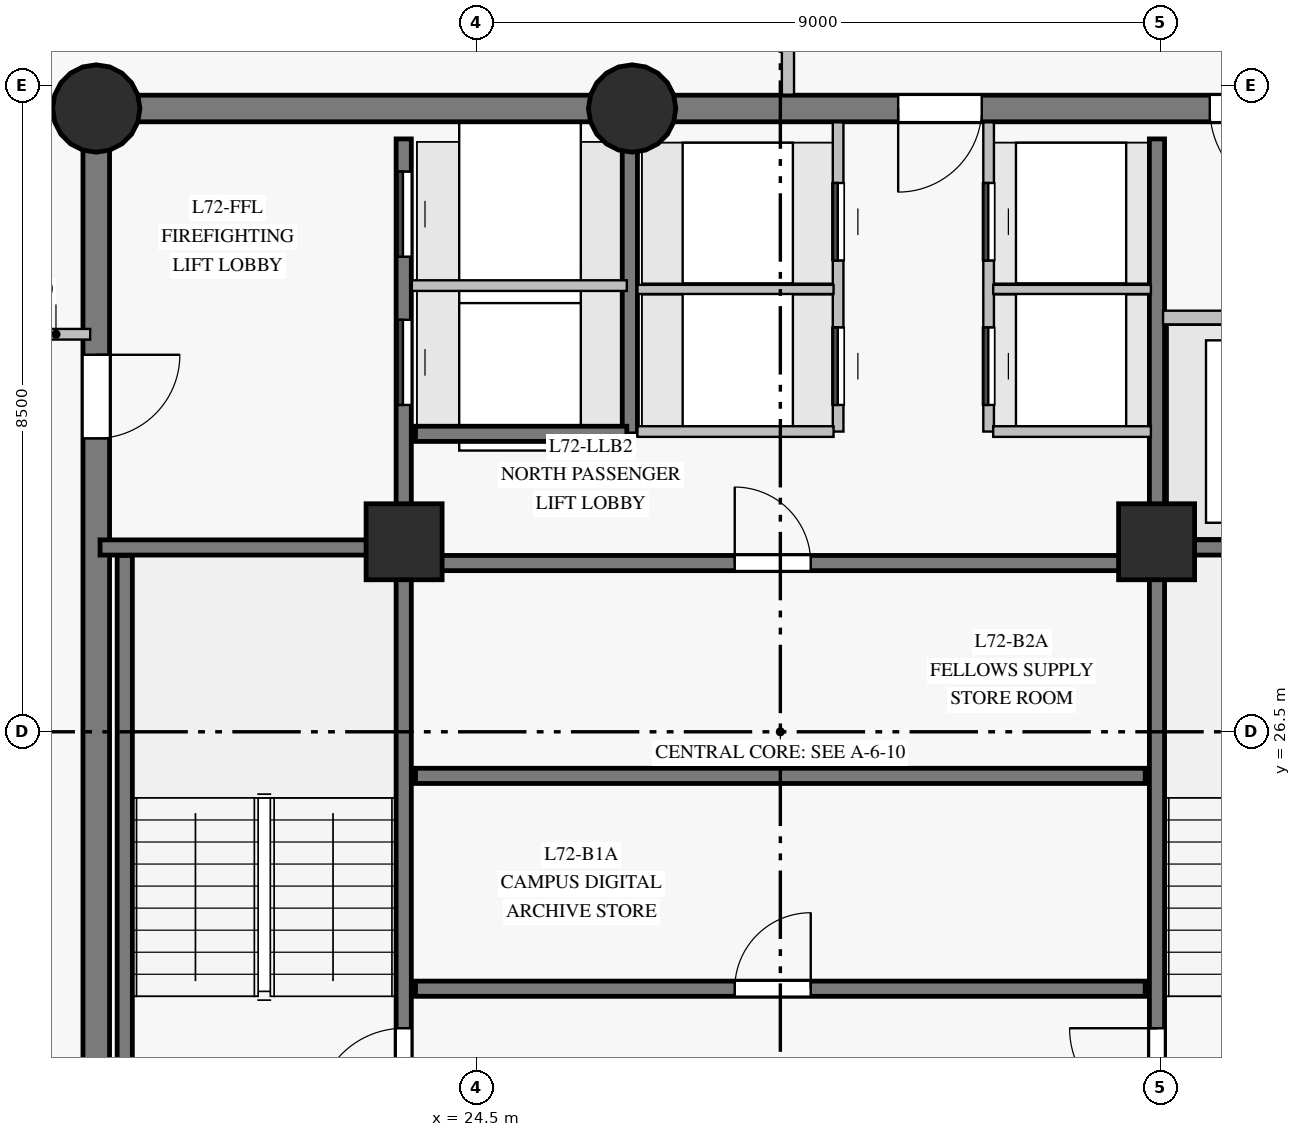
"""IFC4 building model, lengths in metres.
Left out: names, types, materials, properties, quantities, classifications, styles, units other than length and angle.
Written with IfcOpenShell. Run it as: python <this file> out.ifc"""

import sys

from ifc_helpers import new_model, si_unit, direction, frame, frame_2d, origin, origin_with_axes, origin_2d, place, context, subcontext, project, spatial, rectangle, circle, extrude, source, transform, mapped, element, fill, save


model = new_model("IFC4")
c1 = context("Model", 3, precision=1e-05, world=origin(), true_north=direction((0.0, 1.0)))
c2 = subcontext(c1, "Body", "Model", "MODEL_VIEW")
j1 = project(units=[si_unit("LENGTHUNIT", "METRE"), si_unit("PLANEANGLEUNIT", "RADIAN")], contexts=[c1])
p1 = place(None, origin())
s1 = spatial("IfcSite", under=j1, at=p1, CompositionType="ELEMENT")
p2 = place(p1, origin())
s2 = spatial("IfcBuilding", under=s1, at=p2, CompositionType="ELEMENT")
p3 = place(p2, frame((0.0, 0.0, 244.35)))
s3 = spatial("IfcBuildingStorey", under=s2, at=p3, CompositionType="ELEMENT", Elevation=244.35)
p4 = place(p3, frame((37.5, 34.7, 0.0), z_axis=(0.0, 0.0, 1.0), x_axis=(-1.0, 0.0, 0.0)))
e1 = element("IfcWall", 1, at=p4, inside=s3, PredefinedType="SHEAR", context=c2, shape_type="SweptSolid", body=[
    extrude(rectangle(XDim=10.95, YDim=0.35, at=frame_2d((5.475, 0.0))), origin(), (0.0, 0.0, 1.0), 2.85),
])
p5 = place(p4, frame((2.15, 0.0, 0.0)))
e2 = element("IfcOpeningElement", 2, at=p5, cuts=e1, PredefinedType="OPENING", context=c2, shape_type="SweptSolid", body=[
    extrude(rectangle(XDim=1.2, YDim=2.15, at=frame_2d((0.6, 1.075))), frame((0.0, 0.185, 0.0), z_axis=(0.0, -1.0, 0.0), x_axis=(1.0, 0.0, 0.0)), (0.0, 0.0, 1.0), 0.37),
])
p6 = place(p4, frame((6.35, 0.0, 0.0)))
e3 = element("IfcOpeningElement", 3, at=p6, cuts=e1, PredefinedType="OPENING", context=c2, shape_type="SweptSolid", body=[
    extrude(rectangle(XDim=1.1, YDim=2.15, at=frame_2d((0.55, 1.075))), frame((0.0, 0.185, 0.0), z_axis=(0.0, -1.0, 0.0), x_axis=(1.0, 0.0, 0.0)), (0.0, 0.0, 1.0), 0.37),
])
p7 = place(p3, frame((26.55, 34.7, 0.0), z_axis=(0.0, 0.0, 1.0), x_axis=(-1.0, 0.0, 0.0)))
e4 = element("IfcWall", 4, at=p7, inside=s3, PredefinedType="SHEAR", context=c2, shape_type="SweptSolid", body=[
    extrude(rectangle(XDim=7.05, YDim=0.35, at=frame_2d((3.525, 0.0))), origin(), (0.0, 0.0, 1.0), 2.85),
])
p8 = place(p3, frame((19.5, 34.7, 0.0), z_axis=(0.0, 0.0, 1.0), x_axis=(0.0, -1.0, 0.0)))
e5 = element("IfcWall", 5, at=p8, inside=s3, PredefinedType="SHEAR", context=c2, shape_type="SweptSolid", body=[
    extrude(rectangle(XDim=16.4, YDim=0.35, at=frame_2d((8.2, 0.0))), origin(), (0.0, 0.0, 1.0), 2.85),
])
p9 = place(p8, frame((3.24, 0.0, 0.0)))
e6 = element("IfcOpeningElement", 6, at=p9, cuts=e5, PredefinedType="OPENING", context=c2, shape_type="SweptSolid", body=[
    extrude(rectangle(XDim=1.1, YDim=2.15, at=frame_2d((0.55, 1.075))), frame((0.0, 0.185, 0.0), z_axis=(0.0, -1.0, 0.0), x_axis=(1.0, 0.0, 0.0)), (0.0, 0.0, 1.0), 0.37),
])
m1 = source(origin_with_axes(), c2, "Body", "SweptSolid", [
    extrude(circle(Radius=0.575, at=origin_2d()), origin(), (0.0, 0.0, 1.0), 3.05),
])
for number, where, z_axis, x_axis in (
    (7, (19.5, 34.7, 0.0), (0.0, 0.0, 1.0), (1.0, 0.0, 0.0)),
    (8, (26.55, 34.7, 0.0), (0.0, 0.0, 1.0), (1.0, 0.0, 0.0)),
):
    element("IfcColumn", number, at=place(p3, frame(where, z_axis=z_axis, x_axis=x_axis)), inside=s3, PredefinedType="COLUMN", context=c2, shape_type="MappedRepresentation", body=[
        mapped(m1, transform((0.0, 0.0, 0.0), scale=1.0)),
    ])
m2 = source(origin_with_axes(), c2, "Body", "SweptSolid", [
    extrude(rectangle(XDim=1.0, YDim=1.0, at=origin_2d()), origin(), (0.0, 0.0, 1.0), 3.05),
])
for number, where, z_axis, x_axis in (
    (9, (23.55, 29.0, 0.0), (0.0, 0.0, 1.0), (1.0, 0.0, 0.0)),
    (10, (33.45, 29.0, 0.0), (0.0, 0.0, 1.0), (1.0, 0.0, 0.0)),
):
    element("IfcColumn", number, at=place(p3, frame(where, z_axis=z_axis, x_axis=x_axis)), inside=s3, PredefinedType="COLUMN", context=c2, shape_type="MappedRepresentation", body=[
        mapped(m2, transform((0.0, 0.0, 0.0), scale=1.0)),
    ])
p10 = place(p3, frame((23.545, 18.7, 0.0), z_axis=(0.0, 0.0, 1.0), x_axis=(0.0, 1.0, 0.0)))
e11 = element("IfcWall", 11, at=p10, inside=s3, PredefinedType="SHEAR", context=c2, shape_type="SweptSolid", body=[
    extrude(rectangle(XDim=15.6, YDim=0.2, at=frame_2d((7.8, 0.0))), origin(), (0.0, 0.0, 1.0), 2.85),
])
p11 = place(p10, frame((2.75, 0.0, 0.0)))
e12 = element("IfcOpeningElement", 12, at=p11, cuts=e11, PredefinedType="OPENING", context=c2, shape_type="SweptSolid", body=[
    extrude(rectangle(XDim=1.15, YDim=2.15, at=frame_2d((0.575, 1.075))), frame((0.0, 0.11, 0.0), z_axis=(0.0, -1.0, 0.0), x_axis=(1.0, 0.0, 0.0)), (0.0, 0.0, 1.0), 0.22),
])
p12 = place(p10, frame((0.14, 0.0, 0.0)))
e13 = element("IfcOpeningElement", 13, at=p12, cuts=e11, PredefinedType="OPENING", context=c2, shape_type="SweptSolid", body=[
    extrude(rectangle(XDim=0.88, YDim=2.1, at=frame_2d((0.44, 1.05))), frame((0.0, 0.11, 0.0), z_axis=(0.0, -1.0, 0.0), x_axis=(1.0, 0.0, 0.0)), (0.0, 0.0, 1.0), 0.22),
])
p13 = place(p10, frame((1.36, 0.0, 0.0)))
e14 = element("IfcOpeningElement", 14, at=p13, cuts=e11, PredefinedType="OPENING", context=c2, shape_type="SweptSolid", body=[
    extrude(rectangle(XDim=0.88, YDim=2.1, at=frame_2d((0.44, 1.05))), frame((0.0, 0.11, 0.0), z_axis=(0.0, -1.0, 0.0), x_axis=(1.0, 0.0, 0.0)), (0.0, 0.0, 1.0), 0.22),
])
p14 = place(p10, frame((12.1, 0.0, 0.0)))
e15 = element("IfcOpeningElement", 15, at=p14, cuts=e11, PredefinedType="OPENING", context=c2, shape_type="SweptSolid", body=[
    extrude(rectangle(XDim=1.12, YDim=2.15, at=frame_2d((0.56, 1.075))), frame((0.0, 0.11, 0.0), z_axis=(0.0, -1.0, 0.0), x_axis=(1.0, 0.0, 0.0)), (0.0, 0.0, 1.0), 0.22),
])
p15 = place(p10, frame((14.05, 0.0, 0.0)))
e16 = element("IfcOpeningElement", 16, at=p15, cuts=e11, PredefinedType="OPENING", context=c2, shape_type="SweptSolid", body=[
    extrude(rectangle(XDim=1.12, YDim=2.15, at=frame_2d((0.56, 1.075))), frame((0.0, 0.11, 0.0), z_axis=(0.0, -1.0, 0.0), x_axis=(1.0, 0.0, 0.0)), (0.0, 0.0, 1.0), 0.22),
])
p16 = place(p3, frame((33.455, 18.7, 0.0), z_axis=(0.0, 0.0, 1.0), x_axis=(0.0, 1.0, 0.0)))
e17 = element("IfcWall", 17, at=p16, inside=s3, PredefinedType="SHEAR", context=c2, shape_type="SweptSolid", body=[
    extrude(rectangle(XDim=15.6, YDim=0.2, at=frame_2d((7.8, 0.0))), origin(), (0.0, 0.0, 1.0), 2.85),
])
p17 = place(p16, frame((2.75, 0.0, 0.0)))
e18 = element("IfcOpeningElement", 18, at=p17, cuts=e17, PredefinedType="OPENING", context=c2, shape_type="SweptSolid", body=[
    extrude(rectangle(XDim=1.15, YDim=2.15, at=frame_2d((0.575, 1.075))), frame((0.0, 0.11, 0.0), z_axis=(0.0, -1.0, 0.0), x_axis=(1.0, 0.0, 0.0)), (0.0, 0.0, 1.0), 0.22),
])
p18 = place(p16, frame((0.55, 0.0, 0.0)))
e19 = element("IfcOpeningElement", 19, at=p18, cuts=e17, PredefinedType="OPENING", context=c2, shape_type="SweptSolid", body=[
    extrude(rectangle(XDim=0.94, YDim=2.1, at=frame_2d((0.47, 1.05))), frame((0.0, 0.11, 0.0), z_axis=(0.0, -1.0, 0.0), x_axis=(1.0, 0.0, 0.0)), (0.0, 0.0, 1.0), 0.22),
])
p19 = place(p3, frame((23.7, 23.12, 0.0), z_axis=(0.0, 0.0, 1.0), x_axis=(1.0, 0.0, 0.0)))
e20 = element("IfcWall", 20, at=p19, inside=s3, PredefinedType="SHEAR", context=c2, shape_type="SweptSolid", body=[
    extrude(rectangle(XDim=9.6, YDim=0.2, at=frame_2d((4.8, 0.0))), origin(), (0.0, 0.0, 1.0), 2.85),
])
p20 = place(p19, frame((4.2, 0.0, 0.0)))
e21 = element("IfcOpeningElement", 21, at=p20, cuts=e20, PredefinedType="OPENING", context=c2, shape_type="SweptSolid", body=[
    extrude(rectangle(XDim=1.0, YDim=2.15, at=frame_2d((0.5, 1.075))), frame((0.0, 0.11, 0.0), z_axis=(0.0, -1.0, 0.0), x_axis=(1.0, 0.0, 0.0)), (0.0, 0.0, 1.0), 0.22),
])
p21 = place(p3, frame((23.7, 25.92, 0.0), z_axis=(0.0, 0.0, 1.0), x_axis=(1.0, 0.0, 0.0)))
e22 = element("IfcWall", 22, at=p21, inside=s3, PredefinedType="SHEAR", context=c2, shape_type="SweptSolid", body=[
    extrude(rectangle(XDim=9.6, YDim=0.2, at=frame_2d((4.8, 0.0))), origin(), (0.0, 0.0, 1.0), 2.85),
])
p22 = place(p3, frame((23.7, 28.72, 0.0), z_axis=(0.0, 0.0, 1.0), x_axis=(1.0, 0.0, 0.0)))
e23 = element("IfcWall", 23, at=p22, inside=s3, PredefinedType="SHEAR", context=c2, shape_type="SweptSolid", body=[
    extrude(rectangle(XDim=9.6, YDim=0.2, at=frame_2d((4.8, 0.0))), origin(), (0.0, 0.0, 1.0), 2.85),
])
p23 = place(p22, frame((4.2, 0.0, 0.0)))
e24 = element("IfcOpeningElement", 24, at=p23, cuts=e23, PredefinedType="OPENING", context=c2, shape_type="SweptSolid", body=[
    extrude(rectangle(XDim=1.0, YDim=2.15, at=frame_2d((0.5, 1.075))), frame((0.0, 0.11, 0.0), z_axis=(0.0, -1.0, 0.0), x_axis=(1.0, 0.0, 0.0)), (0.0, 0.0, 1.0), 0.22),
])
p24 = place(p3, frame((19.875, 21.32, 0.0), z_axis=(0.0, 0.0, 1.0), x_axis=(0.0, 1.0, 0.0)))
e25 = element("IfcWall", 25, at=p24, inside=s3, PredefinedType="SHEAR", context=c2, shape_type="SweptSolid", body=[
    extrude(rectangle(XDim=7.5, YDim=0.2, at=frame_2d((3.75, 0.0))), origin(), (0.0, 0.0, 1.0), 2.85),
])
for number, where, z_axis, x_axis in (
    (26, (33.455, 28.925, 0.0), (0.0, 0.0, 1.0), (1.0, 0.0, 0.0)),
    (27, (19.55, 28.925, 0.0), (0.0, 0.0, 1.0), (1.0, 0.0, 0.0)),
):
    element("IfcWall", number, at=place(p3, frame(where, z_axis=z_axis, x_axis=x_axis)), inside=s3, PredefinedType="SHEAR", context=c2, shape_type="SweptSolid", body=[
        extrude(rectangle(XDim=3.995, YDim=0.2, at=frame_2d((1.998, 0.0))), origin(), (0.0, 0.0, 1.0), 2.85),
    ])
p25 = place(p3, frame((26.52, 30.42, 0.0), z_axis=(0.0, 0.0, 1.0), x_axis=(0.0, 1.0, 0.0)))
e28 = element("IfcWall", 28, at=p25, inside=s3, PredefinedType="SHEAR", context=c2, shape_type="SweptSolid", body=[
    extrude(rectangle(XDim=3.86, YDim=0.2, at=frame_2d((1.93, 0.0))), origin(), (0.0, 0.0, 1.0), 2.85),
])
p26 = place(p3, frame((23.7, 30.42, 0.0), z_axis=(0.0, 0.0, 1.0), x_axis=(1.0, 0.0, 0.0)))
e29 = element("IfcWall", 29, at=p26, inside=s3, PredefinedType="SHEAR", context=c2, shape_type="SweptSolid", body=[
    extrude(rectangle(XDim=2.78, YDim=0.2, at=frame_2d((1.39, 0.0))), origin(), (0.0, 0.0, 1.0), 2.85),
])
p27 = place(p3, frame((29.26, 30.45, 0.0), z_axis=(0.0, 0.0, 1.0), x_axis=(0.0, 1.0, 0.0)))
e30 = element("IfcWall", 30, at=p27, inside=s3, PredefinedType="PARTITIONING", context=c2, shape_type="SweptSolid", body=[
    extrude(rectangle(XDim=4.068, YDim=0.14, at=frame_2d((2.034, 0.0))), origin(), (0.0, 0.0, 1.0), 2.85),
])
p28 = place(p27, frame((0.35, 0.0, 0.0)))
e31 = element("IfcOpeningElement", 31, at=p28, cuts=e30, PredefinedType="OPENING", context=c2, shape_type="SweptSolid", body=[
    extrude(rectangle(XDim=1.02, YDim=2.15, at=frame_2d((0.51, 1.075))), frame((0.0, 0.08, 0.0), z_axis=(0.0, -1.0, 0.0), x_axis=(1.0, 0.0, 0.0)), (0.0, 0.0, 1.0), 0.16),
])
p29 = place(p27, frame((2.25, 0.0, 0.0)))
e32 = element("IfcOpeningElement", 32, at=p29, cuts=e30, PredefinedType="OPENING", context=c2, shape_type="SweptSolid", body=[
    extrude(rectangle(XDim=1.02, YDim=2.15, at=frame_2d((0.51, 1.075))), frame((0.0, 0.08, 0.0), z_axis=(0.0, -1.0, 0.0), x_axis=(1.0, 0.0, 0.0)), (0.0, 0.0, 1.0), 0.16),
])
p30 = place(p3, frame((31.24, 30.45, 0.0), z_axis=(0.0, 0.0, 1.0), x_axis=(0.0, 1.0, 0.0)))
e33 = element("IfcWall", 33, at=p30, inside=s3, PredefinedType="PARTITIONING", context=c2, shape_type="SweptSolid", body=[
    extrude(rectangle(XDim=4.068, YDim=0.14, at=frame_2d((2.034, 0.0))), origin(), (0.0, 0.0, 1.0), 2.85),
])
p31 = place(p30, frame((0.35, 0.0, 0.0)))
e34 = element("IfcOpeningElement", 34, at=p31, cuts=e33, PredefinedType="OPENING", context=c2, shape_type="SweptSolid", body=[
    extrude(rectangle(XDim=1.02, YDim=2.15, at=frame_2d((0.51, 1.075))), frame((0.0, 0.08, 0.0), z_axis=(0.0, -1.0, 0.0), x_axis=(1.0, 0.0, 0.0)), (0.0, 0.0, 1.0), 0.16),
])
p32 = place(p30, frame((2.25, 0.0, 0.0)))
e35 = element("IfcOpeningElement", 35, at=p32, cuts=e33, PredefinedType="OPENING", context=c2, shape_type="SweptSolid", body=[
    extrude(rectangle(XDim=1.02, YDim=2.15, at=frame_2d((0.51, 1.075))), frame((0.0, 0.08, 0.0), z_axis=(0.0, -1.0, 0.0), x_axis=(1.0, 0.0, 0.0)), (0.0, 0.0, 1.0), 0.16),
])
p33 = place(p3, frame((33.535, 31.95, 0.0), z_axis=(0.0, 0.0, 1.0), x_axis=(1.0, 0.0, 0.0)))
e36 = element("IfcWall", 36, at=p33, inside=s3, PredefinedType="PARTITIONING", context=c2, shape_type="SweptSolid", body=[
    extrude(rectangle(XDim=3.784, YDim=0.18, at=frame_2d((1.892, 0.0))), origin(), (0.0, 0.0, 1.0), 2.85),
])
p34 = place(p33, frame((0.9, 0.0, 0.0)))
e37 = element("IfcOpeningElement", 37, at=p34, cuts=e36, PredefinedType="OPENING", context=c2, shape_type="SweptSolid", body=[
    extrude(rectangle(XDim=1.3, YDim=2.2, at=frame_2d((0.65, 1.1))), frame((0.0, 0.1, 0.0), z_axis=(0.0, -1.0, 0.0), x_axis=(1.0, 0.0, 0.0)), (0.0, 0.0, 1.0), 0.2),
])
p35 = place(p3, frame((23.652, 32.37, 0.0), z_axis=(0.0, 0.0, 1.0), x_axis=(1.0, 0.0, 0.0)))
e38 = element("IfcWall", 38, at=p35, inside=s3, PredefinedType="PARTITIONING", context=c2, shape_type="SweptSolid", body=[
    extrude(rectangle(XDim=2.828, YDim=0.14, at=frame_2d((1.414, 0.0))), origin(), (0.0, 0.0, 1.0), 2.85),
])
p36 = place(p3, frame((19.42, 31.73, 0.0), z_axis=(0.0, 0.0, 1.0), x_axis=(-1.0, 0.0, 0.0)))
e39 = element("IfcWall", 39, at=p36, inside=s3, PredefinedType="PARTITIONING", context=c2, shape_type="SweptSolid", body=[
    extrude(rectangle(XDim=2.75, YDim=0.14, at=frame_2d((1.375, 0.0))), origin(), (0.0, 0.0, 1.0), 2.85),
])
p37 = place(p36, frame((0.9, 0.0, 0.0)))
e40 = element("IfcOpeningElement", 40, at=p37, cuts=e39, PredefinedType="OPENING", context=c2, shape_type="SweptSolid", body=[
    extrude(rectangle(XDim=0.96, YDim=2.15, at=frame_2d((0.48, 1.075))), frame((0.0, 0.08, 0.0), z_axis=(0.0, -1.0, 0.0), x_axis=(1.0, 0.0, 0.0)), (0.0, 0.0, 1.0), 0.16),
])
p38 = place(p3, frame((26.62, 30.45, 0.0), z_axis=(0.0, 0.0, 1.0), x_axis=(1.0, 0.0, 0.0)))
e41 = element("IfcWall", 41, at=p38, inside=s3, PredefinedType="PARTITIONING", context=c2, shape_type="SweptSolid", body=[
    extrude(rectangle(XDim=2.58, YDim=0.14, at=frame_2d((1.29, 0.0))), origin(), (0.0, 0.0, 1.0), 2.85),
])
p39 = place(p3, frame((26.62, 32.32, 0.0), z_axis=(0.0, 0.0, 1.0), x_axis=(1.0, 0.0, 0.0)))
e42 = element("IfcWall", 42, at=p39, inside=s3, PredefinedType="PARTITIONING", context=c2, shape_type="SweptSolid", body=[
    extrude(rectangle(XDim=2.58, YDim=0.12, at=frame_2d((1.29, 0.0))), origin(), (0.0, 0.0, 1.0), 2.85),
])
p40 = place(p3, frame((31.3, 30.45, 0.0), z_axis=(0.0, 0.0, 1.0), x_axis=(1.0, 0.0, 0.0)))
e43 = element("IfcWall", 43, at=p40, inside=s3, PredefinedType="PARTITIONING", context=c2, shape_type="SweptSolid", body=[
    extrude(rectangle(XDim=2.075, YDim=0.14, at=frame_2d((1.038, 0.0))), origin(), (0.0, 0.0, 1.0), 2.85),
])
p41 = place(p3, frame((31.3, 32.32, 0.0), z_axis=(0.0, 0.0, 1.0), x_axis=(1.0, 0.0, 0.0)))
e44 = element("IfcWall", 44, at=p41, inside=s3, PredefinedType="PARTITIONING", context=c2, shape_type="SweptSolid", body=[
    extrude(rectangle(XDim=2.075, YDim=0.12, at=frame_2d((1.038, 0.0))), origin(), (0.0, 0.0, 1.0), 2.85),
])
p42 = place(p3, frame((28.6, 34.882, 0.0), z_axis=(0.0, 0.0, 1.0), x_axis=(0.0, 1.0, 0.0)))
e45 = element("IfcWall", 45, at=p42, inside=s3, PredefinedType="PARTITIONING", context=c2, shape_type="SweptSolid", body=[
    extrude(rectangle(XDim=1.518, YDim=0.16, at=frame_2d((0.759, 0.0))), origin(), (0.0, 0.0, 1.0), 2.85),
])
m3 = source(origin_with_axes(), c2, "Body", "SweptSolid", [
    extrude(rectangle(XDim=1.15, YDim=2.15, at=frame_2d((0.575, 1.075))), frame((0.0, 0.025, 0.0), z_axis=(0.0, -1.0, 0.0), x_axis=(1.0, 0.0, 0.0)), (0.0, 0.0, 1.0), 0.05),
])
p43 = place(p11, origin())
e46 = element("IfcDoor", 46, at=p43, inside=s3, OperationType="SINGLE_SWING_LEFT", PredefinedType="DOOR", context=c2, shape_type="MappedRepresentation", body=[
    mapped(m3, transform((0.0, 0.0, 0.0), scale=1.0)),
])
fill(e12, e46)
p44 = place(p17, origin())
e47 = element("IfcDoor", 47, at=p44, inside=s3, OperationType="SINGLE_SWING_RIGHT", PredefinedType="DOOR", context=c2, shape_type="MappedRepresentation", body=[
    mapped(m3, transform((0.0, 0.0, 0.0), scale=1.0)),
])
fill(e18, e47)
m4 = source(origin_with_axes(), c2, "Body", "SweptSolid", [
    extrude(rectangle(XDim=1.1, YDim=2.15, at=frame_2d((0.55, 1.075))), frame((0.0, 0.025, 0.0), z_axis=(0.0, -1.0, 0.0), x_axis=(1.0, 0.0, 0.0)), (0.0, 0.0, 1.0), 0.05),
])
p45 = place(p9, origin())
e48 = element("IfcDoor", 48, at=p45, inside=s3, OperationType="SINGLE_SWING_LEFT", PredefinedType="DOOR", context=c2, shape_type="MappedRepresentation", body=[
    mapped(m4, transform((0.0, 0.0, 0.0), scale=1.0)),
])
fill(e6, e48)
m5 = source(origin_with_axes(), c2, "Body", "SweptSolid", [
    extrude(rectangle(XDim=1.2, YDim=2.15, at=frame_2d((0.6, 1.075))), frame((0.0, 0.025, 0.0), z_axis=(0.0, -1.0, 0.0), x_axis=(1.0, 0.0, 0.0)), (0.0, 0.0, 1.0), 0.05),
])
p46 = place(p5, origin())
e49 = element("IfcDoor", 49, at=p46, inside=s3, OperationType="SINGLE_SWING_LEFT", PredefinedType="DOOR", context=c2, shape_type="MappedRepresentation", body=[
    mapped(m5, transform((0.0, 0.0, 0.0), scale=1.0)),
])
fill(e2, e49)
m6 = source(origin_with_axes(), c2, "Body", "SweptSolid", [
    extrude(rectangle(XDim=1.0, YDim=2.15, at=frame_2d((0.5, 1.075))), frame((0.0, 0.025, 0.0), z_axis=(0.0, -1.0, 0.0), x_axis=(1.0, 0.0, 0.0)), (0.0, 0.0, 1.0), 0.05),
])
p47 = place(p20, origin())
e50 = element("IfcDoor", 50, at=p47, inside=s3, OperationType="SINGLE_SWING_RIGHT", PredefinedType="DOOR", context=c2, shape_type="MappedRepresentation", body=[
    mapped(m6, transform((0.0, 0.0, 0.0), scale=1.0)),
])
fill(e21, e50)
p48 = place(p23, origin())
e51 = element("IfcDoor", 51, at=p48, inside=s3, OperationType="SINGLE_SWING_LEFT", PredefinedType="DOOR", context=c2, shape_type="MappedRepresentation", body=[
    mapped(m6, transform((0.0, 0.0, 0.0), scale=1.0)),
])
fill(e24, e51)
p49 = place(p6, origin())
e52 = element("IfcDoor", 52, at=p49, inside=s3, OperationType="SINGLE_SWING_RIGHT", PredefinedType="DOOR", context=c2, shape_type="MappedRepresentation", body=[
    mapped(m4, transform((0.0, 0.0, 0.0), scale=1.0)),
])
fill(e3, e52)
m7 = source(origin_with_axes(), c2, "Body", "SweptSolid", [
    extrude(rectangle(XDim=1.12, YDim=2.15, at=frame_2d((0.56, 1.075))), frame((0.0, 0.025, 0.0), z_axis=(0.0, -1.0, 0.0), x_axis=(1.0, 0.0, 0.0)), (0.0, 0.0, 1.0), 0.05),
])
p50 = place(p14, origin())
e53 = element("IfcDoor", 53, at=p50, inside=s3, OperationType="SLIDING_TO_LEFT", PredefinedType="DOOR", context=c2, shape_type="MappedRepresentation", body=[
    mapped(m7, transform((0.0, 0.0, 0.0), scale=1.0)),
])
fill(e15, e53)
p51 = place(p15, origin())
e54 = element("IfcDoor", 54, at=p51, inside=s3, OperationType="SLIDING_TO_RIGHT", PredefinedType="DOOR", context=c2, shape_type="MappedRepresentation", body=[
    mapped(m7, transform((0.0, 0.0, 0.0), scale=1.0)),
])
fill(e16, e54)
m8 = source(origin_with_axes(), c2, "Body", "SweptSolid", [
    extrude(rectangle(XDim=1.02, YDim=2.15, at=frame_2d((0.51, 1.075))), frame((0.0, 0.025, 0.0), z_axis=(0.0, -1.0, 0.0), x_axis=(1.0, 0.0, 0.0)), (0.0, 0.0, 1.0), 0.05),
])
p52 = place(p28, origin())
e55 = element("IfcDoor", 55, at=p52, inside=s3, OperationType="SLIDING_TO_LEFT", PredefinedType="DOOR", context=c2, shape_type="MappedRepresentation", body=[
    mapped(m8, transform((0.0, 0.0, 0.0), scale=1.0)),
])
fill(e31, e55)
p53 = place(p29, origin())
e56 = element("IfcDoor", 56, at=p53, inside=s3, OperationType="SLIDING_TO_LEFT", PredefinedType="DOOR", context=c2, shape_type="MappedRepresentation", body=[
    mapped(m8, transform((0.0, 0.0, 0.0), scale=1.0)),
])
fill(e32, e56)
p54 = place(p31, origin())
e57 = element("IfcDoor", 57, at=p54, inside=s3, OperationType="SLIDING_TO_LEFT", PredefinedType="DOOR", context=c2, shape_type="MappedRepresentation", body=[
    mapped(m8, transform((0.0, 0.0, 0.0), scale=1.0)),
])
fill(e34, e57)
p55 = place(p32, origin())
e58 = element("IfcDoor", 58, at=p55, inside=s3, OperationType="SLIDING_TO_LEFT", PredefinedType="DOOR", context=c2, shape_type="MappedRepresentation", body=[
    mapped(m8, transform((0.0, 0.0, 0.0), scale=1.0)),
])
fill(e35, e58)
save(model, sys.argv[1])
